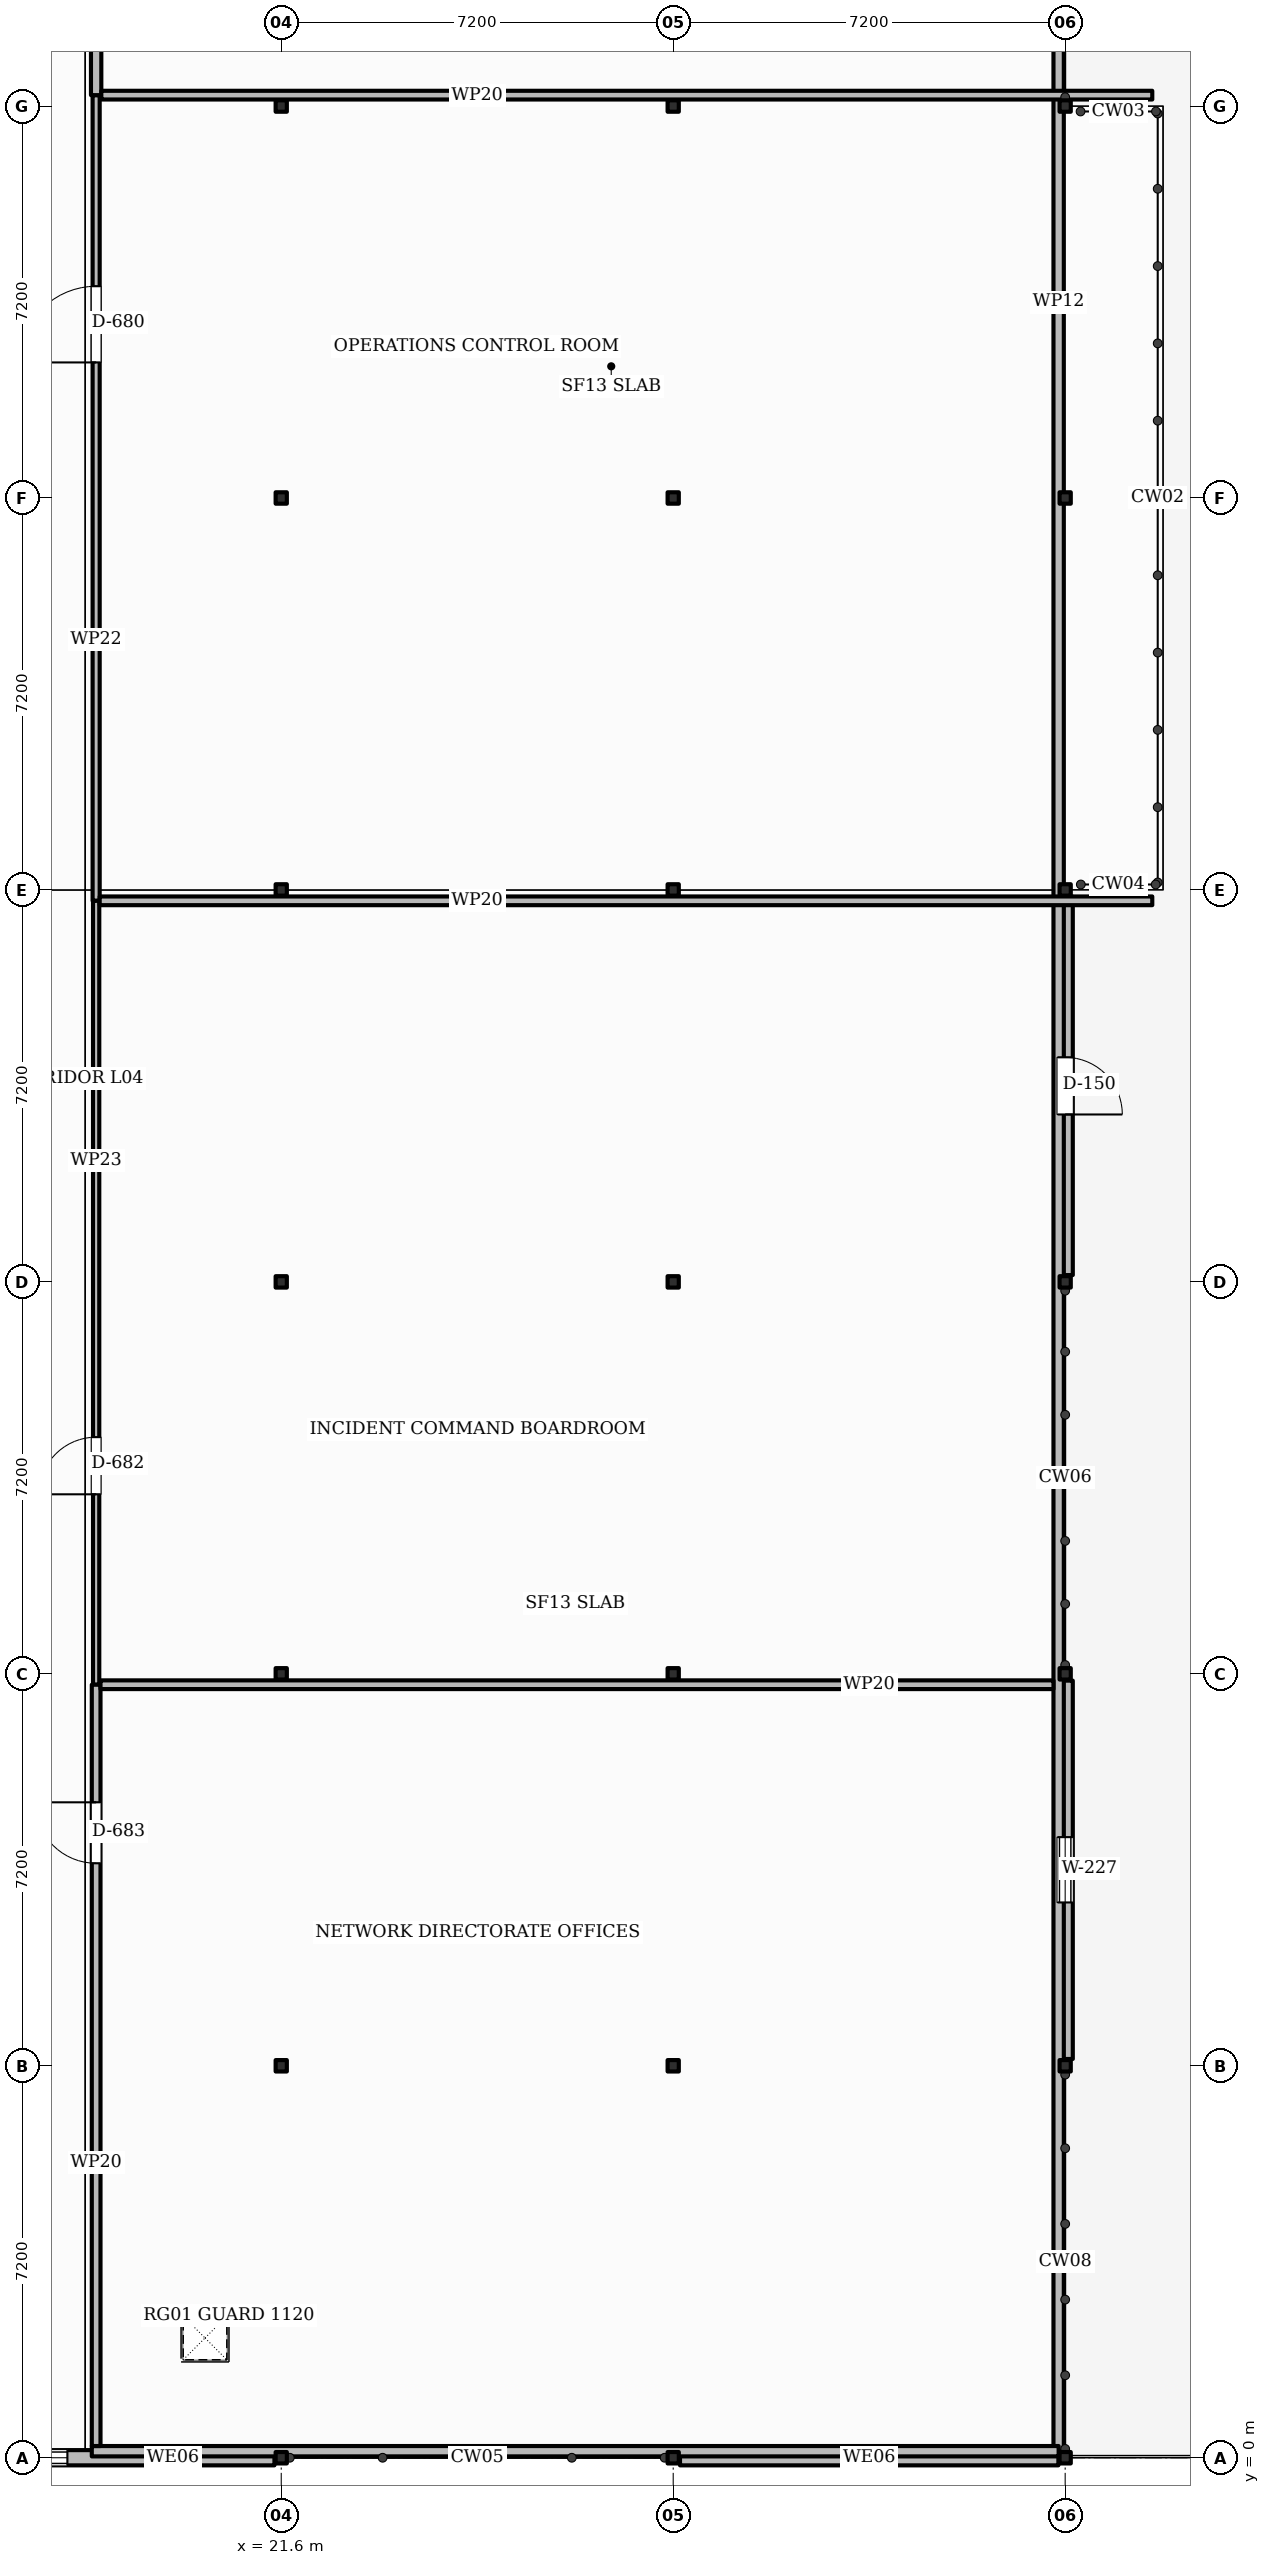
"""IFC4 building model, lengths in metres.
Left out: names, types, materials, properties, quantities, classifications, styles, units other than length and angle.
Written with IfcOpenShell. Run it as: python <this file> out.ifc"""

import sys

from ifc_helpers import new_model, si_unit, direction, frame, frame_2d, origin, origin_2d, place, context, subcontext, project, spatial, rectangle, i_section, extrude, element, fill, save


model = new_model("IFC4")
c1 = context("Model", 3, precision=1e-05, world=origin(), true_north=direction((0.0, 1.0)))
c2 = subcontext(c1, "Body", "Model", "MODEL_VIEW")
j1 = project(units=[si_unit("LENGTHUNIT", "METRE"), si_unit("PLANEANGLEUNIT", "RADIAN")], contexts=[c1])
p1 = place(None, origin())
s1 = spatial("IfcSite", under=j1, at=p1, CompositionType="ELEMENT")
p2 = place(p1, origin())
s2 = spatial("IfcBuilding", under=s1, at=p2, CompositionType="ELEMENT")
p3 = place(p2, frame((0.0, 0.0, 18.9)))
s3 = spatial("IfcBuildingStorey", under=s2, at=p3, CompositionType="ELEMENT", Elevation=18.9)
for number, where, z_axis, x_axis in (
    (1, (21.6, 0.0, 0.0), (0.0, 0.0, 1.0), (1.0, 0.0, 0.0)),
    (2, (21.6, 7.2, 0.0), (0.0, 0.0, 1.0), (1.0, 0.0, 0.0)),
    (3, (21.6, 14.4, 0.0), (0.0, 0.0, 1.0), (1.0, 0.0, 0.0)),
    (4, (21.6, 21.6, 0.0), (0.0, 0.0, 1.0), (1.0, 0.0, 0.0)),
    (5, (21.6, 28.8, 0.0), (0.0, 0.0, 1.0), (1.0, 0.0, 0.0)),
    (6, (21.6, 36.0, 0.0), (0.0, 0.0, 1.0), (1.0, 0.0, 0.0)),
    (7, (21.6, 43.2, 0.0), (0.0, 0.0, 1.0), (1.0, 0.0, 0.0)),
    (8, (28.8, 0.0, 0.0), (0.0, 0.0, 1.0), (1.0, 0.0, 0.0)),
    (9, (28.8, 7.2, 0.0), (0.0, 0.0, 1.0), (1.0, 0.0, 0.0)),
    (10, (28.8, 14.4, 0.0), (0.0, 0.0, 1.0), (1.0, 0.0, 0.0)),
    (11, (28.8, 21.6, 0.0), (0.0, 0.0, 1.0), (1.0, 0.0, 0.0)),
    (12, (28.8, 28.8, 0.0), (0.0, 0.0, 1.0), (1.0, 0.0, 0.0)),
    (13, (28.8, 36.0, 0.0), (0.0, 0.0, 1.0), (1.0, 0.0, 0.0)),
    (14, (28.8, 43.2, 0.0), (0.0, 0.0, 1.0), (1.0, 0.0, 0.0)),
    (15, (36.0, 0.0, 0.0), (0.0, 0.0, 1.0), (1.0, 0.0, 0.0)),
    (16, (36.0, 7.2, 0.0), (0.0, 0.0, 1.0), (1.0, 0.0, 0.0)),
    (17, (36.0, 14.4, 0.0), (0.0, 0.0, 1.0), (1.0, 0.0, 0.0)),
    (18, (36.0, 21.6, 0.0), (0.0, 0.0, 1.0), (1.0, 0.0, 0.0)),
    (19, (36.0, 28.8, 0.0), (0.0, 0.0, 1.0), (1.0, 0.0, 0.0)),
    (20, (36.0, 36.0, 0.0), (0.0, 0.0, 1.0), (1.0, 0.0, 0.0)),
    (21, (36.0, 43.2, 0.0), (0.0, 0.0, 1.0), (1.0, 0.0, 0.0)),
):
    element("IfcColumn", number, at=place(p3, frame(where, z_axis=z_axis, x_axis=x_axis)), inside=s3, PredefinedType="COLUMN", context=c2, shape_type="SweptSolid", body=[
        extrude(i_section(OverallWidth=0.206, OverallDepth=0.21, WebThickness=0.01, FlangeThickness=0.014, FilletRadius=0.01, at=origin_2d()), origin(), (0.0, 0.0, 1.0), 4.5),
    ])
p4 = place(p3, frame((35.875, 0.0, 0.0), z_axis=(0.0, 0.0, 1.0), x_axis=(-1.0, 0.0, 0.0)))
e22 = element("IfcWall", 22, at=p4, inside=s3, PredefinedType="SOLIDWALL", context=c2, shape_type="SweptSolid", body=[
    extrude(rectangle(XDim=6.95, YDim=0.28, at=frame_2d((3.475, 0.0))), origin(), (0.0, 0.0, 1.0), 3.85),
])
p5 = place(p3, frame((21.475, 0.0, 0.0), z_axis=(0.0, 0.0, 1.0), x_axis=(-1.0, 0.0, 0.0)))
e23 = element("IfcWall", 23, at=p5, inside=s3, PredefinedType="SOLIDWALL", context=c2, shape_type="SweptSolid", body=[
    extrude(rectangle(XDim=6.95, YDim=0.28, at=frame_2d((3.475, 0.0))), origin(), (0.0, 0.0, 1.0), 3.658),
])
p6 = place(p5, frame((3.803, 0.0, 1.05)))
e24 = element("IfcOpeningElement", 24, at=p6, cuts=e23, PredefinedType="OPENING", context=c2, shape_type="SweptSolid", body=[
    extrude(rectangle(XDim=2.47, YDim=1.5, at=frame_2d((1.235, 0.75))), frame((0.0, 0.15, 0.0), z_axis=(0.0, -1.0, 0.0), x_axis=(1.0, 0.0, 0.0)), (0.0, 0.0, 1.0), 0.3),
])
p7 = place(p3, frame((36.0, 28.675, 0.0), z_axis=(0.0, 0.0, 1.0), x_axis=(0.0, -1.0, 0.0)))
e25 = element("IfcWall", 25, at=p7, inside=s3, PredefinedType="SOLIDWALL", context=c2, shape_type="SweptSolid", body=[
    extrude(rectangle(XDim=6.95, YDim=0.28, at=frame_2d((3.475, 0.0))), origin(), (0.0, 0.0, 1.0), 3.85),
])
p8 = place(p7, frame((2.95, 0.0, 0.0)))
e26 = element("IfcOpeningElement", 26, at=p8, cuts=e25, PredefinedType="OPENING", context=c2, shape_type="SweptSolid", body=[
    extrude(rectangle(XDim=1.05, YDim=2.1, at=frame_2d((0.525, 1.05))), frame((0.0, 0.15, 0.0), z_axis=(0.0, -1.0, 0.0), x_axis=(1.0, 0.0, 0.0)), (0.0, 0.0, 1.0), 0.3),
])
p9 = place(p3, frame((36.0, 14.275, 0.0), z_axis=(0.0, 0.0, 1.0), x_axis=(0.0, -1.0, 0.0)))
e27 = element("IfcWall", 27, at=p9, inside=s3, PredefinedType="SOLIDWALL", context=c2, shape_type="SweptSolid", body=[
    extrude(rectangle(XDim=6.95, YDim=0.28, at=frame_2d((3.475, 0.0))), origin(), (0.0, 0.0, 1.0), 3.85),
])
p10 = place(p9, frame((2.875, 0.0, 1.05)))
e28 = element("IfcOpeningElement", 28, at=p10, cuts=e27, PredefinedType="OPENING", context=c2, shape_type="SweptSolid", body=[
    extrude(rectangle(XDim=1.2, YDim=2.1, at=frame_2d((0.6, 1.05))), frame((0.0, 0.15, 0.0), z_axis=(0.0, -1.0, 0.0), x_axis=(1.0, 0.0, 0.0)), (0.0, 0.0, 1.0), 0.3),
])
p11 = place(p3, frame((35.88, 57.48, 4.5), z_axis=(0.0, 0.0, 1.0), x_axis=(0.0, -1.0, 0.0)))
e29 = element("IfcWall", 29, at=p11, inside=s3, PredefinedType="PARAPET", context=c2, shape_type="SweptSolid", body=[
    extrude(rectangle(XDim=57.36, YDim=0.19, at=frame_2d((28.68, 0.0))), origin(), (0.0, 0.0, 1.0), 0.9),
])
p12 = place(p3, frame((35.88, 0.12, 4.5), z_axis=(0.0, 0.0, 1.0), x_axis=(-1.0, 0.0, 0.0)))
e30 = element("IfcWall", 30, at=p12, inside=s3, PredefinedType="PARAPET", context=c2, shape_type="SweptSolid", body=[
    extrude(rectangle(XDim=17.76, YDim=0.19, at=frame_2d((8.88, 0.0))), origin(), (0.0, 0.0, 1.0), 0.9),
])
p13 = place(p3, frame((18.2, 28.6, 0.0), z_axis=(0.0, 0.0, 1.0), x_axis=(0.0, 1.0, 0.0)))
e31 = element("IfcWall", 31, at=p13, inside=s3, PredefinedType="PARTITIONING", context=c2, shape_type="SweptSolid", body=[
    extrude(rectangle(XDim=14.8, YDim=0.13, at=frame_2d((7.4, 0.0))), origin(), (0.0, 0.0, 1.0), 3.55),
])
p14 = place(p13, frame((9.89, 0.0, 0.0)))
e32 = element("IfcOpeningElement", 32, at=p14, cuts=e31, PredefinedType="OPENING", context=c2, shape_type="SweptSolid", body=[
    extrude(rectangle(XDim=1.4, YDim=2.15, at=frame_2d((0.7, 1.075))), frame((0.0, 0.075, 0.0), z_axis=(0.0, -1.0, 0.0), x_axis=(1.0, 0.0, 0.0)), (0.0, 0.0, 1.0), 0.15),
])
p15 = place(p3, frame((18.2, 43.4, 0.0), z_axis=(0.0, 0.0, 1.0), x_axis=(0.0, 1.0, 0.0)))
e33 = element("IfcWall", 33, at=p15, inside=s3, PredefinedType="PARTITIONING", context=c2, shape_type="SweptSolid", body=[
    extrude(rectangle(XDim=13.985, YDim=0.19, at=frame_2d((6.993, 0.0))), origin(), (0.0, 0.0, 1.0), 3.55),
])
p16 = place(p15, frame((2.648, 0.0, 0.0)))
e34 = element("IfcOpeningElement", 34, at=p16, cuts=e33, PredefinedType="OPENING", context=c2, shape_type="SweptSolid", body=[
    extrude(rectangle(XDim=1.25, YDim=2.15, at=frame_2d((0.625, 1.075))), frame((0.0, 0.105, 0.0), z_axis=(0.0, -1.0, 0.0), x_axis=(1.0, 0.0, 0.0)), (0.0, 0.0, 1.0), 0.21),
])
p17 = place(p3, frame((18.2, 14.2, 0.0), z_axis=(0.0, 0.0, 1.0), x_axis=(0.0, 1.0, 0.0)))
e35 = element("IfcWall", 35, at=p17, inside=s3, PredefinedType="PARTITIONING", context=c2, shape_type="SweptSolid", body=[
    extrude(rectangle(XDim=14.4, YDim=0.115, at=frame_2d((7.2, 0.0))), origin(), (0.0, 0.0, 1.0), 3.55),
])
p18 = place(p17, frame((3.498, 0.0, 0.0)))
e36 = element("IfcOpeningElement", 36, at=p18, cuts=e35, PredefinedType="OPENING", context=c2, shape_type="SweptSolid", body=[
    extrude(rectangle(XDim=1.05, YDim=2.15, at=frame_2d((0.525, 1.075))), frame((0.0, 0.067, 0.0), z_axis=(0.0, -1.0, 0.0), x_axis=(1.0, 0.0, 0.0)), (0.0, 0.0, 1.0), 0.135),
])
p19 = place(p3, frame((18.2, 0.215, 0.0), z_axis=(0.0, 0.0, 1.0), x_axis=(0.0, 1.0, 0.0)))
e37 = element("IfcWall", 37, at=p19, inside=s3, PredefinedType="PARTITIONING", context=c2, shape_type="SweptSolid", body=[
    extrude(rectangle(XDim=13.985, YDim=0.16, at=frame_2d((6.992, 0.0))), origin(), (0.0, 0.0, 1.0), 3.55),
])
p20 = place(p19, frame((10.705, 0.0, 0.0)))
e38 = element("IfcOpeningElement", 38, at=p20, cuts=e37, PredefinedType="OPENING", context=c2, shape_type="SweptSolid", body=[
    extrude(rectangle(XDim=1.12, YDim=2.18, at=frame_2d((0.56, 1.09))), frame((0.0, 0.09, 0.0), z_axis=(0.0, -1.0, 0.0), x_axis=(1.0, 0.0, 0.0)), (0.0, 0.0, 1.0), 0.18),
])
p21 = place(p3, frame((18.265, 28.6, 0.0), z_axis=(0.0, 0.0, 1.0), x_axis=(1.0, 0.0, 0.0)))
e39 = element("IfcWall", 39, at=p21, inside=s3, PredefinedType="PARTITIONING", context=c2, shape_type="SweptSolid", body=[
    extrude(rectangle(XDim=19.335, YDim=0.16, at=frame_2d((9.667, 0.0))), origin(), (0.0, 0.0, 1.0), 3.55),
])
p22 = place(p3, frame((18.295, 43.4, 0.0), z_axis=(0.0, 0.0, 1.0), x_axis=(1.0, 0.0, 0.0)))
e40 = element("IfcWall", 40, at=p22, inside=s3, PredefinedType="PARTITIONING", context=c2, shape_type="SweptSolid", body=[
    extrude(rectangle(XDim=19.305, YDim=0.16, at=frame_2d((9.653, 0.0))), origin(), (0.0, 0.0, 1.0), 3.55),
])
p23 = place(p3, frame((18.28, 14.2, 0.0), z_axis=(0.0, 0.0, 1.0), x_axis=(1.0, 0.0, 0.0)))
e41 = element("IfcWall", 41, at=p23, inside=s3, PredefinedType="PARTITIONING", context=c2, shape_type="SweptSolid", body=[
    extrude(rectangle(XDim=17.505, YDim=0.16, at=frame_2d((8.752, 0.0))), origin(), (0.0, 0.0, 1.0), 3.55),
])
p24 = place(p6, origin())
e42 = element("IfcWindow", 42, at=p24, inside=s3, PartitioningType="SINGLE_PANEL", PredefinedType="WINDOW", context=c2, shape_type="SweptSolid", body=[
    extrude(rectangle(XDim=2.47, YDim=1.5, at=frame_2d((1.235, 0.75))), frame((0.0, 0.03, 0.0), z_axis=(0.0, -1.0, 0.0), x_axis=(1.0, 0.0, 0.0)), (0.0, 0.0, 1.0), 0.06),
])
fill(e24, e42)
p25 = place(p10, origin())
e43 = element("IfcWindow", 43, at=p25, inside=s3, PartitioningType="SINGLE_PANEL", PredefinedType="WINDOW", context=c2, shape_type="SweptSolid", body=[
    extrude(rectangle(XDim=1.2, YDim=2.1, at=frame_2d((0.6, 1.05))), frame((0.0, 0.03, 0.0), z_axis=(0.0, -1.0, 0.0), x_axis=(1.0, 0.0, 0.0)), (0.0, 0.0, 1.0), 0.06),
])
fill(e28, e43)
p26 = place(p8, origin())
e44 = element("IfcDoor", 44, at=p26, inside=s3, OperationType="SINGLE_SWING_RIGHT", PredefinedType="DOOR", context=c2, shape_type="SweptSolid", body=[
    extrude(rectangle(XDim=1.05, YDim=2.1, at=frame_2d((0.525, 1.05))), frame((0.0, 0.025, 0.0), z_axis=(0.0, -1.0, 0.0), x_axis=(1.0, 0.0, 0.0)), (0.0, 0.0, 1.0), 0.05),
])
fill(e26, e44)
p27 = place(p14, origin())
e45 = element("IfcDoor", 45, at=p27, inside=s3, OperationType="SINGLE_SWING_LEFT", PredefinedType="DOOR", context=c2, shape_type="SweptSolid", body=[
    extrude(rectangle(XDim=1.4, YDim=2.15, at=frame_2d((0.7, 1.075))), frame((0.0, 0.025, 0.0), z_axis=(0.0, -1.0, 0.0), x_axis=(1.0, 0.0, 0.0)), (0.0, 0.0, 1.0), 0.05),
])
fill(e32, e45)
p28 = place(p18, origin())
e46 = element("IfcDoor", 46, at=p28, inside=s3, OperationType="SINGLE_SWING_LEFT", PredefinedType="DOOR", context=c2, shape_type="SweptSolid", body=[
    extrude(rectangle(XDim=1.05, YDim=2.15, at=frame_2d((0.525, 1.075))), frame((0.0, 0.025, 0.0), z_axis=(0.0, -1.0, 0.0), x_axis=(1.0, 0.0, 0.0)), (0.0, 0.0, 1.0), 0.05),
])
fill(e36, e46)
p29 = place(p20, origin())
e47 = element("IfcDoor", 47, at=p29, inside=s3, OperationType="SINGLE_SWING_RIGHT", PredefinedType="DOOR", context=c2, shape_type="SweptSolid", body=[
    extrude(rectangle(XDim=1.12, YDim=2.18, at=frame_2d((0.56, 1.09))), frame((0.0, 0.025, 0.0), z_axis=(0.0, -1.0, 0.0), x_axis=(1.0, 0.0, 0.0)), (0.0, 0.0, 1.0), 0.05),
])
fill(e38, e47)
save(model, sys.argv[1])
